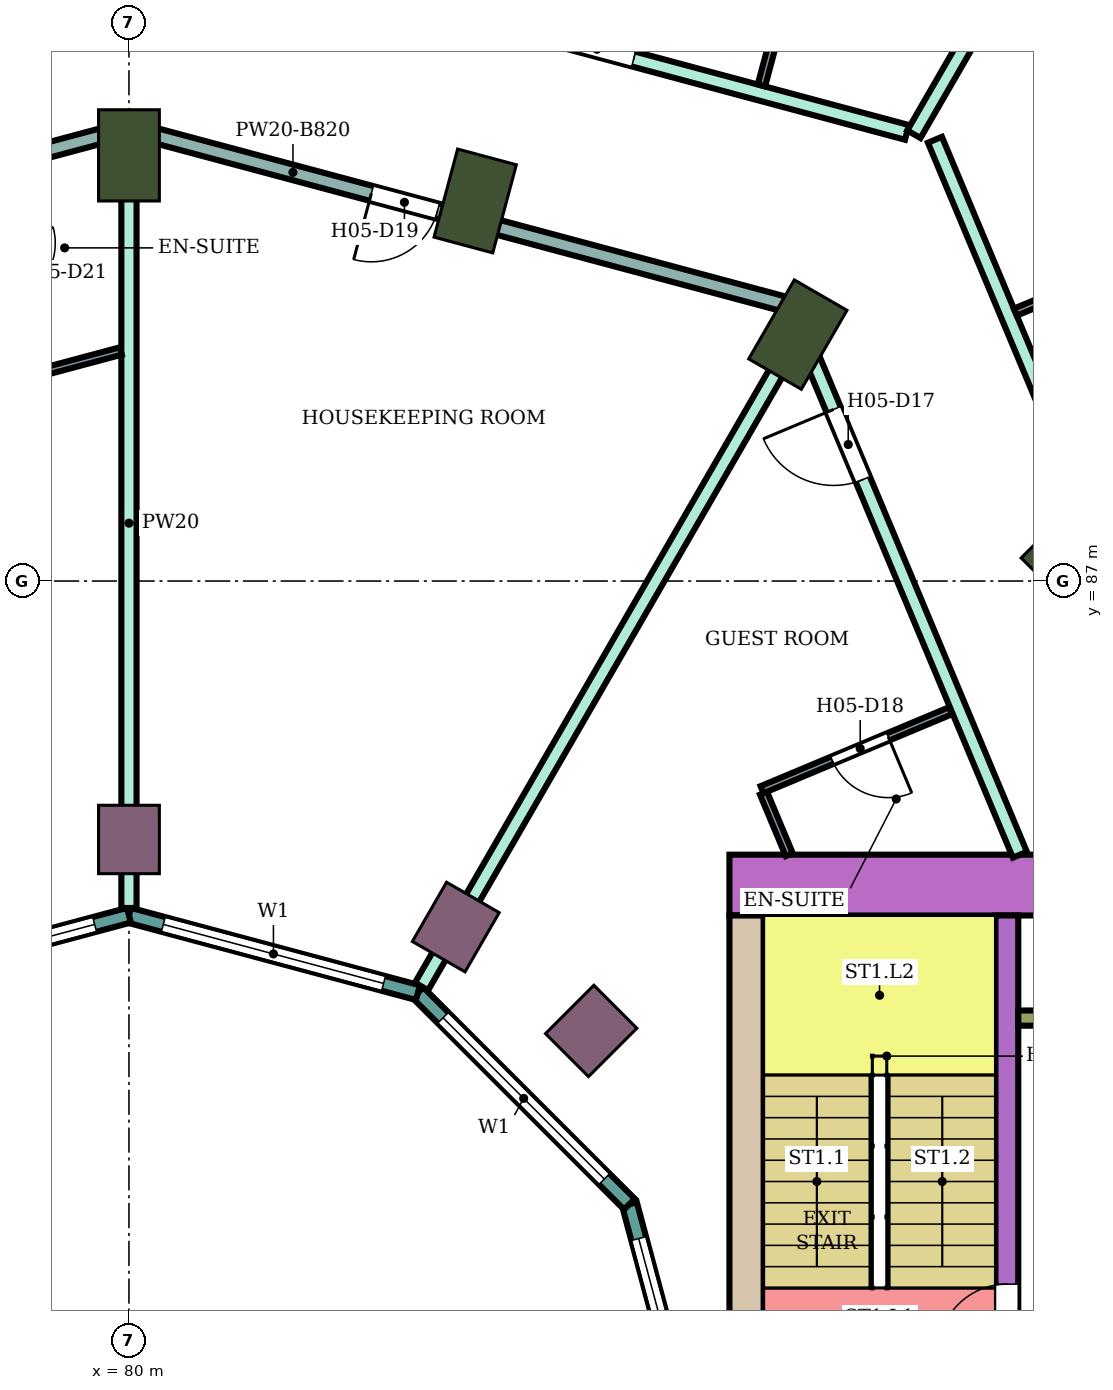
"""IFC4 building model, lengths in metres.
Left out: names, types, materials, properties, quantities, classifications, styles, units other than length and angle.
Written with IfcOpenShell. Run it as: python <this file> out.ifc"""

import sys

from ifc_helpers import new_model, si_unit, direction, frame, frame_2d, origin, origin_2d, place, context, subcontext, project, spatial, rectangle, extrude, element, fill, save


model = new_model("IFC4")
c1 = context("Model", 3, precision=1e-05, world=origin(), true_north=direction((0.0, 1.0)))
c2 = subcontext(c1, "Body", "Model", "MODEL_VIEW")
j1 = project(units=[si_unit("LENGTHUNIT", "METRE"), si_unit("PLANEANGLEUNIT", "RADIAN")], contexts=[c1])
p1 = place(None, origin())
s1 = spatial("IfcSite", under=j1, at=p1, CompositionType="ELEMENT")
p2 = place(p1, origin())
s2 = spatial("IfcBuilding", under=s1, at=p2, CompositionType="ELEMENT")
p3 = place(p2, frame((0.0, 0.0, 82.4)))
s3 = spatial("IfcBuildingStorey", under=s2, at=p3, CompositionType="ELEMENT", Elevation=82.4)
for number, where, z_axis, x_axis in (
    (1, (92.445, 87.445, 0.0), (0.0, 0.0, 1.0), (0.707, 0.707, 0.0)),
    (2, (88.8, 90.242, 0.0), (0.0, 0.0, 1.0), (0.5, 0.866, 0.0)),
    (3, (84.555, 92.0, 0.0), (0.0, 0.0, 1.0), (0.259, 0.966, 0.0)),
    (4, (80.0, 92.6, 0.0), (0.0, 0.0, 1.0), (0.0, 1.0, 0.0)),
):
    element("IfcColumn", number, at=place(p3, frame(where, z_axis=z_axis, x_axis=x_axis)), inside=s3, PredefinedType="COLUMN", context=c2, shape_type="SweptSolid", body=[
        extrude(rectangle(XDim=1.2, YDim=0.8, at=origin_2d()), origin(), (0.0, 0.0, 1.0), 3.8),
    ])
for number, where, z_axis, x_axis in (
    (5, (86.081, 81.081, 0.0), (0.0, 0.0, 1.0), (0.707, 0.707, 0.0)),
    (6, (84.3, 82.448, 0.0), (0.0, 0.0, 1.0), (0.5, 0.866, 0.0)),
    (7, (80.0, 83.6, 0.0), (0.0, 0.0, 1.0), (0.0, 1.0, 0.0)),
):
    element("IfcColumn", number, at=place(p3, frame(where, z_axis=z_axis, x_axis=x_axis)), inside=s3, PredefinedType="COLUMN", context=c2, shape_type="SweptSolid", body=[
        extrude(rectangle(XDim=0.9, YDim=0.8, at=origin_2d()), origin(), (0.0, 0.0, 1.0), 3.8),
    ])
p4 = place(p3, frame((87.9, 83.0, 0.0), z_axis=(0.0, 0.0, 1.0), x_axis=(1.0, 0.0, 0.0)))
e8 = element("IfcWall", 8, at=p4, inside=s3, PredefinedType="SHEAR", context=c2, shape_type="SweptSolid", body=[
    extrude(rectangle(XDim=14.7, YDim=0.8, at=frame_2d((7.35, 0.0))), origin(), (0.0, 0.0, 1.0), 3.48),
])
p5 = place(p4, frame((4.2, 0.0, 0.0)))
e9 = element("IfcOpeningElement", 9, at=p5, cuts=e8, PredefinedType="OPENING", context=c2, shape_type="SweptSolid", body=[
    extrude(rectangle(XDim=2.4, YDim=2.4, at=frame_2d((1.2, 1.2))), frame((0.0, 0.41, 0.0), z_axis=(0.0, -1.0, 0.0), x_axis=(1.0, 0.0, 0.0)), (0.0, 0.0, 1.0), 0.82),
])
p6 = place(p3, frame((88.125, 75.0, 0.0), z_axis=(0.0, 0.0, 1.0), x_axis=(0.0, 1.0, 0.0)))
e10 = element("IfcWall", 10, at=p6, inside=s3, PredefinedType="SHEAR", context=c2, shape_type="SweptSolid", body=[
    extrude(rectangle(XDim=7.6, YDim=0.45, at=frame_2d((3.8, 0.0))), origin(), (0.0, 0.0, 1.0), 3.48),
])
p7 = place(p3, frame((91.55, 75.0, 0.0), z_axis=(0.0, 0.0, 1.0), x_axis=(0.0, 1.0, 0.0)))
e11 = element("IfcWall", 11, at=p7, inside=s3, PredefinedType="SHEAR", context=c2, shape_type="SweptSolid", body=[
    extrude(rectangle(XDim=7.6, YDim=0.3, at=frame_2d((3.8, 0.0))), origin(), (0.0, 0.0, 1.0), 3.48),
])
p8 = place(p7, frame((1.85, 0.0, 0.0)))
e12 = element("IfcOpeningElement", 12, at=p8, cuts=e11, PredefinedType="OPENING", context=c2, shape_type="SweptSolid", body=[
    extrude(rectangle(XDim=0.9, YDim=2.1, at=frame_2d((0.45, 1.05))), frame((0.0, 0.16, 0.0), z_axis=(0.0, -1.0, 0.0), x_axis=(1.0, 0.0, 0.0)), (0.0, 0.0, 1.0), 0.32),
])
p9 = place(p3, frame((91.7, 81.25, 0.0), z_axis=(0.0, 0.0, 1.0), x_axis=(1.0, 0.0, 0.0)))
e13 = element("IfcWall", 13, at=p9, inside=s3, PredefinedType="SHEAR", context=c2, shape_type="SweptSolid", body=[
    extrude(rectangle(XDim=4.65, YDim=0.2, at=frame_2d((2.325, 0.0))), origin(), (0.0, 0.0, 1.0), 3.48),
])
p10 = place(p3, frame((87.604, 75.0, 0.0), z_axis=(0.0, 0.0, 1.0), x_axis=(-0.258789828301, 0.965933654434, 0.0)))
e14 = element("IfcWall", 14, at=p10, inside=s3, PredefinedType="NOTDEFINED", context=c2, shape_type="SweptSolid", body=[
    extrude(rectangle(XDim=3.936, YDim=0.2, at=frame_2d((1.968, 0.0))), origin(), (0.0, 0.0, 1.0), 3.8),
])
p11 = place(p10, frame((0.468, 0.0, 0.9)))
e15 = element("IfcOpeningElement", 15, at=p11, cuts=e14, PredefinedType="OPENING", context=c2, shape_type="SweptSolid", body=[
    extrude(rectangle(XDim=3.0, YDim=2.3, at=frame_2d((1.5, 1.15))), frame((0.0, 0.11, 0.0), z_axis=(0.0, -1.0, 0.0), x_axis=(1.0, 0.0, 0.0)), (0.0, 0.0, 1.0), 0.22),
])
p12 = place(p3, frame((86.585, 78.802, 0.0), z_axis=(0.0, 0.0, 1.0), x_axis=(-0.707106781187, 0.707106781187, 0.0)))
e16 = element("IfcWall", 16, at=p12, inside=s3, PredefinedType="NOTDEFINED", context=c2, shape_type="SweptSolid", body=[
    extrude(rectangle(XDim=3.936, YDim=0.2, at=frame_2d((1.968, 0.0))), origin(), (0.0, 0.0, 1.0), 3.8),
])
p13 = place(p12, frame((0.468, 0.0, 0.9)))
e17 = element("IfcOpeningElement", 17, at=p13, cuts=e16, PredefinedType="OPENING", context=c2, shape_type="SweptSolid", body=[
    extrude(rectangle(XDim=3.0, YDim=2.3, at=frame_2d((1.5, 1.15))), frame((0.0, 0.11, 0.0), z_axis=(0.0, -1.0, 0.0), x_axis=(1.0, 0.0, 0.0)), (0.0, 0.0, 1.0), 0.22),
])
p14 = place(p3, frame((83.802, 81.585, 0.0), z_axis=(0.0, 0.0, 1.0), x_axis=(-0.965933654434, 0.258789828301, 0.0)))
e18 = element("IfcWall", 18, at=p14, inside=s3, PredefinedType="NOTDEFINED", context=c2, shape_type="SweptSolid", body=[
    extrude(rectangle(XDim=3.936, YDim=0.2, at=frame_2d((1.968, 0.0))), origin(), (0.0, 0.0, 1.0), 3.8),
])
p15 = place(p14, frame((0.468, 0.0, 0.9)))
e19 = element("IfcOpeningElement", 19, at=p15, cuts=e18, PredefinedType="OPENING", context=c2, shape_type="SweptSolid", body=[
    extrude(rectangle(XDim=3.0, YDim=2.3, at=frame_2d((1.5, 1.15))), frame((0.0, 0.11, 0.0), z_axis=(0.0, -1.0, 0.0), x_axis=(1.0, 0.0, 0.0)), (0.0, 0.0, 1.0), 0.22),
])
p16 = place(p3, frame((80.0, 82.604, 0.0), z_axis=(0.0, 0.0, 1.0), x_axis=(-0.965933654434, -0.258789828301, 0.0)))
e20 = element("IfcWall", 20, at=p16, inside=s3, PredefinedType="NOTDEFINED", context=c2, shape_type="SweptSolid", body=[
    extrude(rectangle(XDim=3.936, YDim=0.2, at=frame_2d((1.968, 0.0))), origin(), (0.0, 0.0, 1.0), 3.8),
])
p17 = place(p16, frame((0.468, 0.0, 0.9)))
e21 = element("IfcOpeningElement", 21, at=p17, cuts=e20, PredefinedType="OPENING", context=c2, shape_type="SweptSolid", body=[
    extrude(rectangle(XDim=3.0, YDim=2.3, at=frame_2d((1.5, 1.15))), frame((0.0, 0.11, 0.0), z_axis=(0.0, -1.0, 0.0), x_axis=(1.0, 0.0, 0.0)), (0.0, 0.0, 1.0), 0.22),
])
p18 = place(p3, frame((69.397, 92.805, 0.0), z_axis=(0.0, 0.0, 1.0), x_axis=(0.96596468683, 0.258673972015, 0.0)))
e22 = element("IfcWall", 22, at=p18, inside=s3, PredefinedType="PARTITIONING", context=c2, shape_type="SweptSolid", body=[
    extrude(rectangle(XDim=10.937, YDim=0.2, at=frame_2d((5.469, 0.0))), origin(), (0.0, 0.0, 1.0), 3.35),
])
p19 = place(p18, frame((6.163, 0.0, 0.0)))
e23 = element("IfcOpeningElement", 23, at=p19, cuts=e22, PredefinedType="OPENING", context=c2, shape_type="SweptSolid", body=[
    extrude(rectangle(XDim=1.0, YDim=2.1, at=frame_2d((0.5, 1.05))), frame((0.0, 0.11, 0.0), z_axis=(0.0, -1.0, 0.0), x_axis=(1.0, 0.0, 0.0)), (0.0, 0.0, 1.0), 0.22),
])
p20 = place(p18, frame((4.103, 0.0, 0.0)))
e24 = element("IfcOpeningElement", 24, at=p20, cuts=e22, PredefinedType="OPENING", context=c2, shape_type="SweptSolid", body=[
    extrude(rectangle(XDim=1.0, YDim=2.1, at=frame_2d((0.5, 1.05))), frame((0.0, 0.11, 0.0), z_axis=(0.0, -1.0, 0.0), x_axis=(1.0, 0.0, 0.0)), (0.0, 0.0, 1.0), 0.22),
])
p21 = place(p3, frame((71.303, 90.625, 0.0), z_axis=(0.0, 0.0, 1.0), x_axis=(0.965971868307, 0.258647152776, 0.0)))
e25 = element("IfcWall", 25, at=p21, inside=s3, PredefinedType="PARTITIONING", context=c2, shape_type="SweptSolid", body=[
    extrude(rectangle(XDim=8.874, YDim=0.2, at=frame_2d((4.437, 0.0))), origin(), (0.0, 0.0, 1.0), 2.98),
])
p22 = place(p21, frame((0.55, 0.0, 0.0)))
e26 = element("IfcOpeningElement", 26, at=p22, cuts=e25, PredefinedType="OPENING", context=c2, shape_type="SweptSolid", body=[
    extrude(rectangle(XDim=1.0, YDim=2.1, at=frame_2d((0.5, 1.05))), frame((0.0, 0.11, 0.0), z_axis=(0.0, -1.0, 0.0), x_axis=(1.0, 0.0, 0.0)), (0.0, 0.0, 1.0), 0.22),
])
p23 = place(p3, frame((80.0, 82.699, 0.0), z_axis=(0.0, 0.0, 1.0), x_axis=(0.0, 1.0, 0.0)))
e27 = element("IfcWall", 27, at=p23, inside=s3, PredefinedType="PARTITIONING", context=c2, shape_type="SweptSolid", body=[
    extrude(rectangle(XDim=10.125, YDim=0.2, at=frame_2d((5.062, 0.0))), origin(), (0.0, 0.0, 1.0), 3.35),
])
p24 = place(p3, frame((80.0, 92.954, 0.0), z_axis=(0.0, 0.0, 1.0), x_axis=(0.965932194462, -0.258795277586, 0.0)))
e28 = element("IfcWall", 28, at=p24, inside=s3, PredefinedType="PARTITIONING", context=c2, shape_type="SweptSolid", body=[
    extrude(rectangle(XDim=8.934, YDim=0.2, at=frame_2d((4.467, 0.0))), origin(), (0.0, 0.0, 1.0), 2.98),
])
p25 = place(p24, frame((3.302, 0.0, 0.0)))
e29 = element("IfcOpeningElement", 29, at=p25, cuts=e28, PredefinedType="OPENING", context=c2, shape_type="SweptSolid", body=[
    extrude(rectangle(XDim=0.9, YDim=2.1, at=frame_2d((0.45, 1.05))), frame((0.0, 0.11, 0.0), z_axis=(0.0, -1.0, 0.0), x_axis=(1.0, 0.0, 0.0)), (0.0, 0.0, 1.0), 0.22),
])
p26 = place(p3, frame((80.0, 95.648, 0.0), z_axis=(0.0, 0.0, 1.0), x_axis=(0.965852259202, -0.259093445292, 0.0)))
e30 = element("IfcWall", 30, at=p26, inside=s3, PredefinedType="PARTITIONING", context=c2, shape_type="SweptSolid", body=[
    extrude(rectangle(XDim=10.597, YDim=0.2, at=frame_2d((5.298, 0.0))), origin(), (0.0, 0.0, 1.0), 3.35),
])
p27 = place(p26, frame((5.875, 0.0, 0.0)))
e31 = element("IfcOpeningElement", 31, at=p27, cuts=e30, PredefinedType="OPENING", context=c2, shape_type="SweptSolid", body=[
    extrude(rectangle(XDim=1.0, YDim=2.1, at=frame_2d((0.5, 1.05))), frame((0.0, 0.11, 0.0), z_axis=(0.0, -1.0, 0.0), x_axis=(1.0, 0.0, 0.0)), (0.0, 0.0, 1.0), 0.22),
])
p28 = place(p3, frame((83.85, 81.667, 0.0), z_axis=(0.0, 0.0, 1.0), x_axis=(0.500222212082, 0.865897071562, 0.0)))
e32 = element("IfcWall", 32, at=p28, inside=s3, PredefinedType="PARTITIONING", context=c2, shape_type="SweptSolid", body=[
    extrude(rectangle(XDim=9.768, YDim=0.2, at=frame_2d((4.884, 0.0))), origin(), (0.0, 0.0, 1.0), 3.35),
])
p29 = place(p3, frame((88.698, 90.624, 0.0), z_axis=(0.0, 0.0, 1.0), x_axis=(0.386027055918, -0.922487459047, 0.0)))
e33 = element("IfcWall", 33, at=p29, inside=s3, PredefinedType="PARTITIONING", context=c2, shape_type="SweptSolid", body=[
    extrude(rectangle(XDim=7.832, YDim=0.2, at=frame_2d((3.916, 0.0))), origin(), (0.0, 0.0, 1.0), 3.35),
])
p30 = place(p29, frame((1.482, 0.0, 0.0)))
e34 = element("IfcOpeningElement", 34, at=p30, cuts=e33, PredefinedType="OPENING", context=c2, shape_type="SweptSolid", body=[
    extrude(rectangle(XDim=1.0, YDim=2.1, at=frame_2d((0.5, 1.05))), frame((0.0, 0.11, 0.0), z_axis=(0.0, -1.0, 0.0), x_axis=(1.0, 0.0, 0.0)), (0.0, 0.0, 1.0), 0.22),
])
p31 = place(p3, frame((90.327, 92.878, 0.0), z_axis=(0.0, 0.0, 1.0), x_axis=(0.50022153717, 0.865897461453, 0.0)))
e35 = element("IfcWall", 35, at=p31, inside=s3, PredefinedType="PARTITIONING", context=c2, shape_type="SweptSolid", body=[
    extrude(rectangle(XDim=5.152, YDim=0.2, at=frame_2d((2.576, 0.0))), origin(), (0.0, 0.0, 1.0), 3.35),
])
p32 = place(p3, frame((90.604, 92.805, 0.0), z_axis=(0.0, 0.0, 1.0), x_axis=(0.386209298583, -0.922411176042, 0.0)))
e36 = element("IfcWall", 36, at=p32, inside=s3, PredefinedType="PARTITIONING", context=c2, shape_type="SweptSolid", body=[
    extrude(rectangle(XDim=8.48, YDim=0.2, at=frame_2d((4.24, 0.0))), origin(), (0.0, 0.0, 1.0), 3.35),
])
p33 = place(p32, frame((3.723, 0.0, 0.0)))
e37 = element("IfcOpeningElement", 37, at=p33, cuts=e36, PredefinedType="OPENING", context=c2, shape_type="SweptSolid", body=[
    extrude(rectangle(XDim=1.1, YDim=2.1, at=frame_2d((0.55, 1.05))), frame((0.0, 0.11, 0.0), z_axis=(0.0, -1.0, 0.0), x_axis=(1.0, 0.0, 0.0)), (0.0, 0.0, 1.0), 0.22),
])
p34 = place(p3, frame((78.696, 89.706, 0.0), z_axis=(0.0, 0.0, 1.0), x_axis=(0.966002513606, 0.258532674351, 0.0)))
e38 = element("IfcWall", 38, at=p34, inside=s3, PredefinedType="PARTITIONING", context=c2, shape_type="SweptSolid", body=[
    extrude(rectangle(XDim=1.24, YDim=0.1, at=frame_2d((0.62, 0.0))), origin(), (0.0, 0.0, 1.0), 3.35),
])
p35 = place(p3, frame((88.321, 93.521, 0.0), z_axis=(0.0, 0.0, 1.0), x_axis=(0.258677737588, 0.965963678446, 0.0)))
e39 = element("IfcWall", 39, at=p35, inside=s3, PredefinedType="PARTITIONING", context=c2, shape_type="SweptSolid", body=[
    extrude(rectangle(XDim=2.649, YDim=0.1, at=frame_2d((1.325, 0.0))), origin(), (0.0, 0.0, 1.0), 3.35),
])
p36 = place(p3, frame((88.348, 84.209, 0.0), z_axis=(0.0, 0.0, 1.0), x_axis=(0.386077497504, -0.922466349479, 0.0)))
e40 = element("IfcWall", 40, at=p36, inside=s3, PredefinedType="PARTITIONING", context=c2, shape_type="SweptSolid", body=[
    extrude(rectangle(XDim=0.877, YDim=0.1, at=frame_2d((0.438, 0.0))), origin(), (0.0, 0.0, 1.0), 3.35),
])
p37 = place(p3, frame((88.329, 84.255, 0.0), z_axis=(0.0, 0.0, 1.0), x_axis=(0.922320663728, 0.386425404522, 0.0)))
e41 = element("IfcWall", 41, at=p37, inside=s3, PredefinedType="PARTITIONING", context=c2, shape_type="SweptSolid", body=[
    extrude(rectangle(XDim=2.69, YDim=0.1, at=frame_2d((1.345, 0.0))), origin(), (0.0, 0.0, 1.0), 3.35),
])
p38 = place(p37, frame((1.0, 0.0, 0.0)))
e42 = element("IfcOpeningElement", 42, at=p38, cuts=e41, PredefinedType="OPENING", context=c2, shape_type="SweptSolid", body=[
    extrude(rectangle(XDim=0.8, YDim=2.1, at=frame_2d((0.4, 1.05))), frame((0.0, 0.06, 0.0), z_axis=(0.0, -1.0, 0.0), x_axis=(1.0, 0.0, 0.0)), (0.0, 0.0, 1.0), 0.12),
])
p39 = place(p3, frame((91.661, 90.538, 0.0), z_axis=(0.0, 0.0, 1.0), x_axis=(0.922352973625, 0.386348278169, 0.0)))
e43 = element("IfcWall", 43, at=p39, inside=s3, PredefinedType="PARTITIONING", context=c2, shape_type="SweptSolid", body=[
    extrude(rectangle(XDim=2.85, YDim=0.1, at=frame_2d((1.425, 0.0))), origin(), (0.0, 0.0, 1.0), 3.35),
])
p40 = place(p11, origin())
e44 = element("IfcWindow", 44, at=p40, inside=s3, PartitioningType="SINGLE_PANEL", PredefinedType="WINDOW", context=c2, shape_type="SweptSolid", body=[
    extrude(rectangle(XDim=3.0, YDim=2.3, at=frame_2d((1.5, 1.15))), frame((0.0, 0.03, 0.0), z_axis=(0.0, -1.0, 0.0), x_axis=(1.0, 0.0, 0.0)), (0.0, 0.0, 1.0), 0.06),
])
fill(e15, e44)
p41 = place(p13, origin())
e45 = element("IfcWindow", 45, at=p41, inside=s3, PartitioningType="SINGLE_PANEL", PredefinedType="WINDOW", context=c2, shape_type="SweptSolid", body=[
    extrude(rectangle(XDim=3.0, YDim=2.3, at=frame_2d((1.5, 1.15))), frame((0.0, 0.03, 0.0), z_axis=(0.0, -1.0, 0.0), x_axis=(1.0, 0.0, 0.0)), (0.0, 0.0, 1.0), 0.06),
])
fill(e17, e45)
p42 = place(p15, origin())
e46 = element("IfcWindow", 46, at=p42, inside=s3, PartitioningType="SINGLE_PANEL", PredefinedType="WINDOW", context=c2, shape_type="SweptSolid", body=[
    extrude(rectangle(XDim=3.0, YDim=2.3, at=frame_2d((1.5, 1.15))), frame((0.0, 0.03, 0.0), z_axis=(0.0, -1.0, 0.0), x_axis=(1.0, 0.0, 0.0)), (0.0, 0.0, 1.0), 0.06),
])
fill(e19, e46)
p43 = place(p17, origin())
e47 = element("IfcWindow", 47, at=p43, inside=s3, PartitioningType="SINGLE_PANEL", PredefinedType="WINDOW", context=c2, shape_type="SweptSolid", body=[
    extrude(rectangle(XDim=3.0, YDim=2.3, at=frame_2d((1.5, 1.15))), frame((0.0, 0.03, 0.0), z_axis=(0.0, -1.0, 0.0), x_axis=(1.0, 0.0, 0.0)), (0.0, 0.0, 1.0), 0.06),
])
fill(e21, e47)
p44 = place(p27, origin())
e48 = element("IfcDoor", 48, at=p44, inside=s3, OperationType="SINGLE_SWING_LEFT", PredefinedType="DOOR", context=c2, shape_type="SweptSolid", body=[
    extrude(rectangle(XDim=1.0, YDim=2.1, at=frame_2d((0.5, 1.05))), frame((0.0, 0.025, 0.0), z_axis=(0.0, -1.0, 0.0), x_axis=(1.0, 0.0, 0.0)), (0.0, 0.0, 1.0), 0.05),
])
fill(e31, e48)
p45 = place(p30, frame((1.0, 0.0, 0.0), z_axis=(0.0, 0.0, 1.0), x_axis=(-1.0, 0.0, 0.0)))
e49 = element("IfcDoor", 49, at=p45, inside=s3, OperationType="SINGLE_SWING_RIGHT", PredefinedType="DOOR", context=c2, shape_type="SweptSolid", body=[
    extrude(rectangle(XDim=1.0, YDim=2.1, at=frame_2d((0.5, 1.05))), frame((0.0, 0.025, 0.0), z_axis=(0.0, -1.0, 0.0), x_axis=(1.0, 0.0, 0.0)), (0.0, 0.0, 1.0), 0.05),
])
fill(e34, e49)
p46 = place(p38, frame((0.8, 0.0, 0.0), z_axis=(0.0, 0.0, 1.0), x_axis=(-1.0, 0.0, 0.0)))
e50 = element("IfcDoor", 50, at=p46, inside=s3, OperationType="SINGLE_SWING_LEFT", PredefinedType="DOOR", context=c2, shape_type="SweptSolid", body=[
    extrude(rectangle(XDim=0.8, YDim=2.1, at=frame_2d((0.4, 1.05))), frame((0.0, 0.025, 0.0), z_axis=(0.0, -1.0, 0.0), x_axis=(1.0, 0.0, 0.0)), (0.0, 0.0, 1.0), 0.05),
])
fill(e42, e50)
p47 = place(p25, frame((0.9, 0.0, 0.0), z_axis=(0.0, 0.0, 1.0), x_axis=(-1.0, 0.0, 0.0)))
e51 = element("IfcDoor", 51, at=p47, inside=s3, OperationType="SINGLE_SWING_RIGHT", PredefinedType="DOOR", context=c2, shape_type="SweptSolid", body=[
    extrude(rectangle(XDim=0.9, YDim=2.1, at=frame_2d((0.45, 1.05))), frame((0.0, 0.025, 0.0), z_axis=(0.0, -1.0, 0.0), x_axis=(1.0, 0.0, 0.0)), (0.0, 0.0, 1.0), 0.05),
])
fill(e29, e51)
p48 = place(p8, origin())
e52 = element("IfcDoor", 52, at=p48, inside=s3, OperationType="SINGLE_SWING_LEFT", PredefinedType="DOOR", context=c2, shape_type="SweptSolid", body=[
    extrude(rectangle(XDim=0.9, YDim=2.1, at=frame_2d((0.45, 1.05))), frame((0.0, 0.025, 0.0), z_axis=(0.0, -1.0, 0.0), x_axis=(1.0, 0.0, 0.0)), (0.0, 0.0, 1.0), 0.05),
])
fill(e12, e52)
save(model, sys.argv[1])
